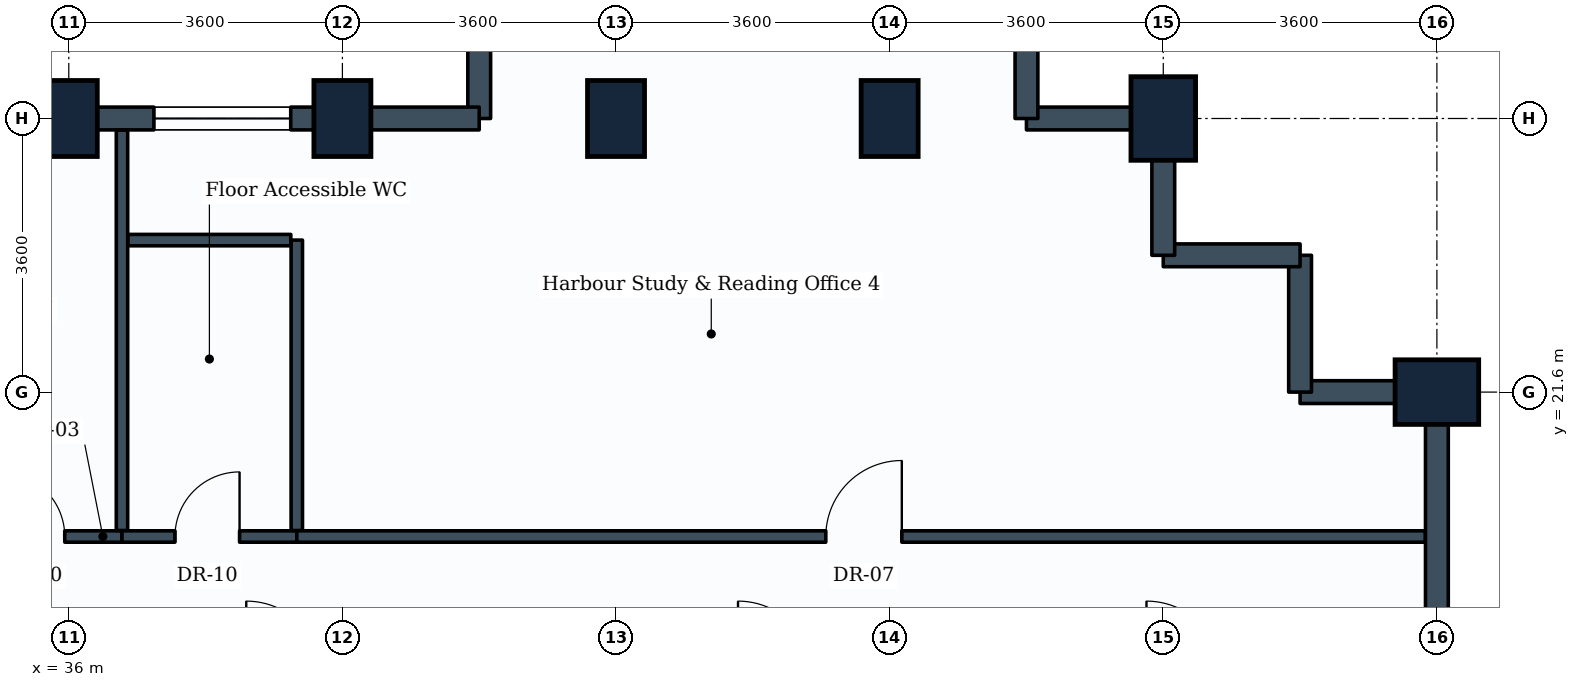
"""IFC4 building model, lengths in metres.
Left out: names, types, materials, properties, quantities, classifications, styles, units other than length and angle.
Written with IfcOpenShell. Run it as: python <this file> out.ifc"""

import sys

from ifc_helpers import new_model, si_unit, direction, frame, frame_2d, origin, origin_2d, place, context, subcontext, project, spatial, rectangle, extrude, element, fill, save


model = new_model("IFC4")
c1 = context("Model", 3, precision=1e-05, world=origin(), true_north=direction((0.0, 1.0)))
c2 = subcontext(c1, "Body", "Model", "MODEL_VIEW")
j1 = project(units=[si_unit("LENGTHUNIT", "METRE"), si_unit("PLANEANGLEUNIT", "RADIAN")], contexts=[c1])
p1 = place(None, origin())
s1 = spatial("IfcSite", under=j1, at=p1, CompositionType="ELEMENT")
p2 = place(p1, origin())
s2 = spatial("IfcBuilding", under=s1, at=p2, CompositionType="ELEMENT")
p3 = place(p2, frame((0.0, 0.0, 150.4)))
s3 = spatial("IfcBuildingStorey", under=s2, at=p3, CompositionType="ELEMENT", Elevation=150.4)
for number, where, z_axis, x_axis in (
    (1, (36.0, 25.2, 0.0), (0.0, 0.0, 1.0), (1.0, 0.0, 0.0)),
    (2, (39.6, 25.2, 0.0), (0.0, 0.0, 1.0), (1.0, 0.0, 0.0)),
    (3, (43.2, 25.2, 0.0), (0.0, 0.0, 1.0), (1.0, 0.0, 0.0)),
    (4, (46.8, 25.2, 0.0), (0.0, 0.0, 1.0), (1.0, 0.0, 0.0)),
):
    element("IfcColumn", number, at=place(p3, frame(where, z_axis=z_axis, x_axis=x_axis)), inside=s3, PredefinedType="COLUMN", context=c2, shape_type="SweptSolid", body=[
        extrude(rectangle(XDim=0.75, YDim=1.0, at=origin_2d()), origin(), (0.0, 0.0, 1.0), 3.8),
    ])
for number, where, z_axis, x_axis in (
    (5, (50.4, 25.2, 0.0), (0.0, 0.0, 1.0), (1.0, 0.0, 0.0)),
    (6, (54.0, 21.6, 0.0), (0.0, 0.0, 1.0), (0.0, 1.0, 0.0)),
):
    element("IfcColumn", number, at=place(p3, frame(where, z_axis=z_axis, x_axis=x_axis)), inside=s3, PredefinedType="COLUMN", context=c2, shape_type="SweptSolid", body=[
        extrude(rectangle(XDim=0.85, YDim=1.1, at=origin_2d()), origin(), (0.0, 0.0, 1.0), 3.8),
    ])
p4 = place(p3, frame((54.0, 21.6, 0.0), z_axis=(0.0, 0.0, 1.0), x_axis=(0.0, -1.0, 0.0)))
e7 = element("IfcWall", 7, at=p4, inside=s3, PredefinedType="STANDARD", context=c2, shape_type="SweptSolid", body=[
    extrude(rectangle(XDim=3.6, YDim=0.3, at=frame_2d((1.8, 0.0))), origin(), (0.0, 0.0, 1.0), 2.93),
])
p5 = place(p3, frame((52.2, 21.6, 0.0), z_axis=(0.0, 0.0, 1.0), x_axis=(1.0, 0.0, 0.0)))
e8 = element("IfcWall", 8, at=p5, inside=s3, PredefinedType="STANDARD", context=c2, shape_type="SweptSolid", body=[
    extrude(rectangle(XDim=1.8, YDim=0.3, at=frame_2d((0.9, 0.0))), origin(), (0.0, 0.0, 1.0), 2.93),
])
p6 = place(p3, frame((52.2, 23.4, 0.0), z_axis=(0.0, 0.0, 1.0), x_axis=(0.0, -1.0, 0.0)))
e9 = element("IfcWall", 9, at=p6, inside=s3, PredefinedType="STANDARD", context=c2, shape_type="SweptSolid", body=[
    extrude(rectangle(XDim=1.8, YDim=0.3, at=frame_2d((0.9, 0.0))), origin(), (0.0, 0.0, 1.0), 3.535),
])
p7 = place(p3, frame((50.4, 23.4, 0.0), z_axis=(0.0, 0.0, 1.0), x_axis=(1.0, 0.0, 0.0)))
e10 = element("IfcWall", 10, at=p7, inside=s3, PredefinedType="STANDARD", context=c2, shape_type="SweptSolid", body=[
    extrude(rectangle(XDim=1.8, YDim=0.3, at=frame_2d((0.9, 0.0))), origin(), (0.0, 0.0, 1.0), 3.535),
])
p8 = place(p3, frame((50.4, 25.2, 0.0), z_axis=(0.0, 0.0, 1.0), x_axis=(0.0, -1.0, 0.0)))
e11 = element("IfcWall", 11, at=p8, inside=s3, PredefinedType="STANDARD", context=c2, shape_type="SweptSolid", body=[
    extrude(rectangle(XDim=1.8, YDim=0.3, at=frame_2d((0.9, 0.0))), origin(), (0.0, 0.0, 1.0), 2.93),
])
p9 = place(p3, frame((48.6, 25.2, 0.0), z_axis=(0.0, 0.0, 1.0), x_axis=(1.0, 0.0, 0.0)))
e12 = element("IfcWall", 12, at=p9, inside=s3, PredefinedType="STANDARD", context=c2, shape_type="SweptSolid", body=[
    extrude(rectangle(XDim=1.8, YDim=0.3, at=frame_2d((0.9, 0.0))), origin(), (0.0, 0.0, 1.0), 2.93),
])
for number, where, z_axis, x_axis in (
    (13, (48.6, 27.3, 0.0), (0.0, 0.0, 1.0), (0.0, -1.0, 0.0)),
    (14, (41.4, 27.3, 0.0), (0.0, 0.0, 1.0), (0.0, -1.0, 0.0)),
):
    element("IfcWall", number, at=place(p3, frame(where, z_axis=z_axis, x_axis=x_axis)), inside=s3, PredefinedType="STANDARD", context=c2, shape_type="SweptSolid", body=[
        extrude(rectangle(XDim=2.1, YDim=0.3, at=frame_2d((1.05, 0.0))), origin(), (0.0, 0.0, 1.0), 2.93),
    ])
p10 = place(p3, frame((39.6, 25.2, 0.0), z_axis=(0.0, 0.0, 1.0), x_axis=(1.0, 0.0, 0.0)))
e15 = element("IfcWall", 15, at=p10, inside=s3, PredefinedType="STANDARD", context=c2, shape_type="SweptSolid", body=[
    extrude(rectangle(XDim=1.8, YDim=0.3, at=frame_2d((0.9, 0.0))), origin(), (0.0, 0.0, 1.0), 2.93),
])
p11 = place(p3, frame((36.0, 25.2, 0.0), z_axis=(0.0, 0.0, 1.0), x_axis=(1.0, 0.0, 0.0)))
e16 = element("IfcWall", 16, at=p11, inside=s3, PredefinedType="STANDARD", context=c2, shape_type="SweptSolid", body=[
    extrude(rectangle(XDim=3.6, YDim=0.3, at=frame_2d((1.8, 0.0))), origin(), (0.0, 0.0, 1.0), 2.93),
])
p12 = place(p11, frame((1.12, 0.0, 0.85)))
e17 = element("IfcOpeningElement", 17, at=p12, cuts=e16, PredefinedType="OPENING", context=c2, shape_type="SweptSolid", body=[
    extrude(rectangle(XDim=1.8, YDim=1.35, at=frame_2d((0.9, 0.675))), frame((0.0, 0.16, 0.0), z_axis=(0.0, -1.0, 0.0), x_axis=(1.0, 0.0, 0.0)), (0.0, 0.0, 1.0), 0.32),
])
p13 = place(p3, frame((32.4, 25.2, 0.0), z_axis=(0.0, 0.0, 1.0), x_axis=(1.0, 0.0, 0.0)))
e18 = element("IfcWall", 18, at=p13, inside=s3, PredefinedType="STANDARD", context=c2, shape_type="SweptSolid", body=[
    extrude(rectangle(XDim=3.6, YDim=0.3, at=frame_2d((1.8, 0.0))), origin(), (0.0, 0.0, 1.0), 2.93),
])
p14 = place(p3, frame((34.479, 19.7, 0.0), z_axis=(0.0, 0.0, 1.0), x_axis=(1.0, 0.0, 0.0)))
e19 = element("IfcWall", 19, at=p14, inside=s3, PredefinedType="PARTITIONING", context=c2, shape_type="SweptSolid", body=[
    extrude(rectangle(XDim=2.221, YDim=0.15, at=frame_2d((1.11, 0.0))), origin(), (0.0, 0.0, 1.0), 3.22),
])
p15 = place(p14, frame((0.618, 0.0, 0.0)))
e20 = element("IfcOpeningElement", 20, at=p15, cuts=e19, PredefinedType="OPENING", context=c2, shape_type="SweptSolid", body=[
    extrude(rectangle(XDim=0.85, YDim=2.1, at=frame_2d((0.425, 1.05))), frame((0.0, 0.085, 0.0), z_axis=(0.0, -1.0, 0.0), x_axis=(1.0, 0.0, 0.0)), (0.0, 0.0, 1.0), 0.17),
])
p16 = place(p3, frame((36.7, 19.779, 0.0), z_axis=(0.0, 0.0, 1.0), x_axis=(0.0, 1.0, 0.0)))
e21 = element("IfcWall", 21, at=p16, inside=s3, PredefinedType="PARTITIONING", context=c2, shape_type="SweptSolid", body=[
    extrude(rectangle(XDim=5.267, YDim=0.15, at=frame_2d((2.633, 0.0))), origin(), (0.0, 0.0, 1.0), 2.93),
])
p17 = place(p3, frame((36.7, 19.7, 0.0), z_axis=(0.0, 0.0, 1.0), x_axis=(1.0, 0.0, 0.0)))
e22 = element("IfcWall", 22, at=p17, inside=s3, PredefinedType="PARTITIONING", context=c2, shape_type="SweptSolid", body=[
    extrude(rectangle(XDim=2.3, YDim=0.15, at=frame_2d((1.15, 0.0))), origin(), (0.0, 0.0, 1.0), 3.535),
])
p18 = place(p17, frame((0.697, 0.0, 0.0)))
e23 = element("IfcOpeningElement", 23, at=p18, cuts=e22, PredefinedType="OPENING", context=c2, shape_type="SweptSolid", body=[
    extrude(rectangle(XDim=0.85, YDim=2.1, at=frame_2d((0.425, 1.05))), frame((0.0, 0.085, 0.0), z_axis=(0.0, -1.0, 0.0), x_axis=(1.0, 0.0, 0.0)), (0.0, 0.0, 1.0), 0.17),
])
p19 = place(p3, frame((39.0, 19.779, 0.0), z_axis=(0.0, 0.0, 1.0), x_axis=(0.0, 1.0, 0.0)))
e24 = element("IfcWall", 24, at=p19, inside=s3, PredefinedType="PARTITIONING", context=c2, shape_type="SweptSolid", body=[
    extrude(rectangle(XDim=3.821, YDim=0.15, at=frame_2d((1.911, 0.0))), origin(), (0.0, 0.0, 1.0), 3.17),
])
p20 = place(p3, frame((36.779, 23.6, 0.0), z_axis=(0.0, 0.0, 1.0), x_axis=(1.0, 0.0, 0.0)))
e25 = element("IfcWall", 25, at=p20, inside=s3, PredefinedType="PARTITIONING", context=c2, shape_type="SweptSolid", body=[
    extrude(rectangle(XDim=2.142, YDim=0.15, at=frame_2d((1.071, 0.0))), origin(), (0.0, 0.0, 1.0), 3.535),
])
p21 = place(p3, frame((39.0, 19.7, 0.0), z_axis=(0.0, 0.0, 1.0), x_axis=(1.0, 0.0, 0.0)))
e26 = element("IfcWall", 26, at=p21, inside=s3, PredefinedType="PARTITIONING", context=c2, shape_type="SweptSolid", body=[
    extrude(rectangle(XDim=14.846, YDim=0.15, at=frame_2d((7.423, 0.0))), origin(), (0.0, 0.0, 1.0), 2.93),
])
p22 = place(p21, frame((6.96, 0.0, 0.0)))
e27 = element("IfcOpeningElement", 27, at=p22, cuts=e26, PredefinedType="OPENING", context=c2, shape_type="SweptSolid", body=[
    extrude(rectangle(XDim=1.0, YDim=2.1, at=frame_2d((0.5, 1.05))), frame((0.0, 0.085, 0.0), z_axis=(0.0, -1.0, 0.0), x_axis=(1.0, 0.0, 0.0)), (0.0, 0.0, 1.0), 0.17),
])
p23 = place(p12, origin())
e28 = element("IfcWindow", 28, at=p23, inside=s3, PartitioningType="SINGLE_PANEL", PredefinedType="WINDOW", context=c2, shape_type="SweptSolid", body=[
    extrude(rectangle(XDim=1.8, YDim=1.35, at=frame_2d((0.9, 0.675))), frame((0.0, 0.03, 0.0), z_axis=(0.0, -1.0, 0.0), x_axis=(1.0, 0.0, 0.0)), (0.0, 0.0, 1.0), 0.06),
])
fill(e17, e28)
p24 = place(p15, origin())
e29 = element("IfcDoor", 29, at=p24, inside=s3, OperationType="SINGLE_SWING_LEFT", PredefinedType="DOOR", context=c2, shape_type="SweptSolid", body=[
    extrude(rectangle(XDim=0.85, YDim=2.1, at=frame_2d((0.425, 1.05))), frame((0.0, 0.025, 0.0), z_axis=(0.0, -1.0, 0.0), x_axis=(1.0, 0.0, 0.0)), (0.0, 0.0, 1.0), 0.05),
])
fill(e20, e29)
p25 = place(p18, origin())
e30 = element("IfcDoor", 30, at=p25, inside=s3, OperationType="SINGLE_SWING_RIGHT", PredefinedType="DOOR", context=c2, shape_type="SweptSolid", body=[
    extrude(rectangle(XDim=0.85, YDim=2.1, at=frame_2d((0.425, 1.05))), frame((0.0, 0.025, 0.0), z_axis=(0.0, -1.0, 0.0), x_axis=(1.0, 0.0, 0.0)), (0.0, 0.0, 1.0), 0.05),
])
fill(e23, e30)
p26 = place(p22, origin())
e31 = element("IfcDoor", 31, at=p26, inside=s3, OperationType="SINGLE_SWING_RIGHT", PredefinedType="DOOR", context=c2, shape_type="SweptSolid", body=[
    extrude(rectangle(XDim=1.0, YDim=2.1, at=frame_2d((0.5, 1.05))), frame((0.0, 0.025, 0.0), z_axis=(0.0, -1.0, 0.0), x_axis=(1.0, 0.0, 0.0)), (0.0, 0.0, 1.0), 0.05),
])
fill(e27, e31)
save(model, sys.argv[1])
